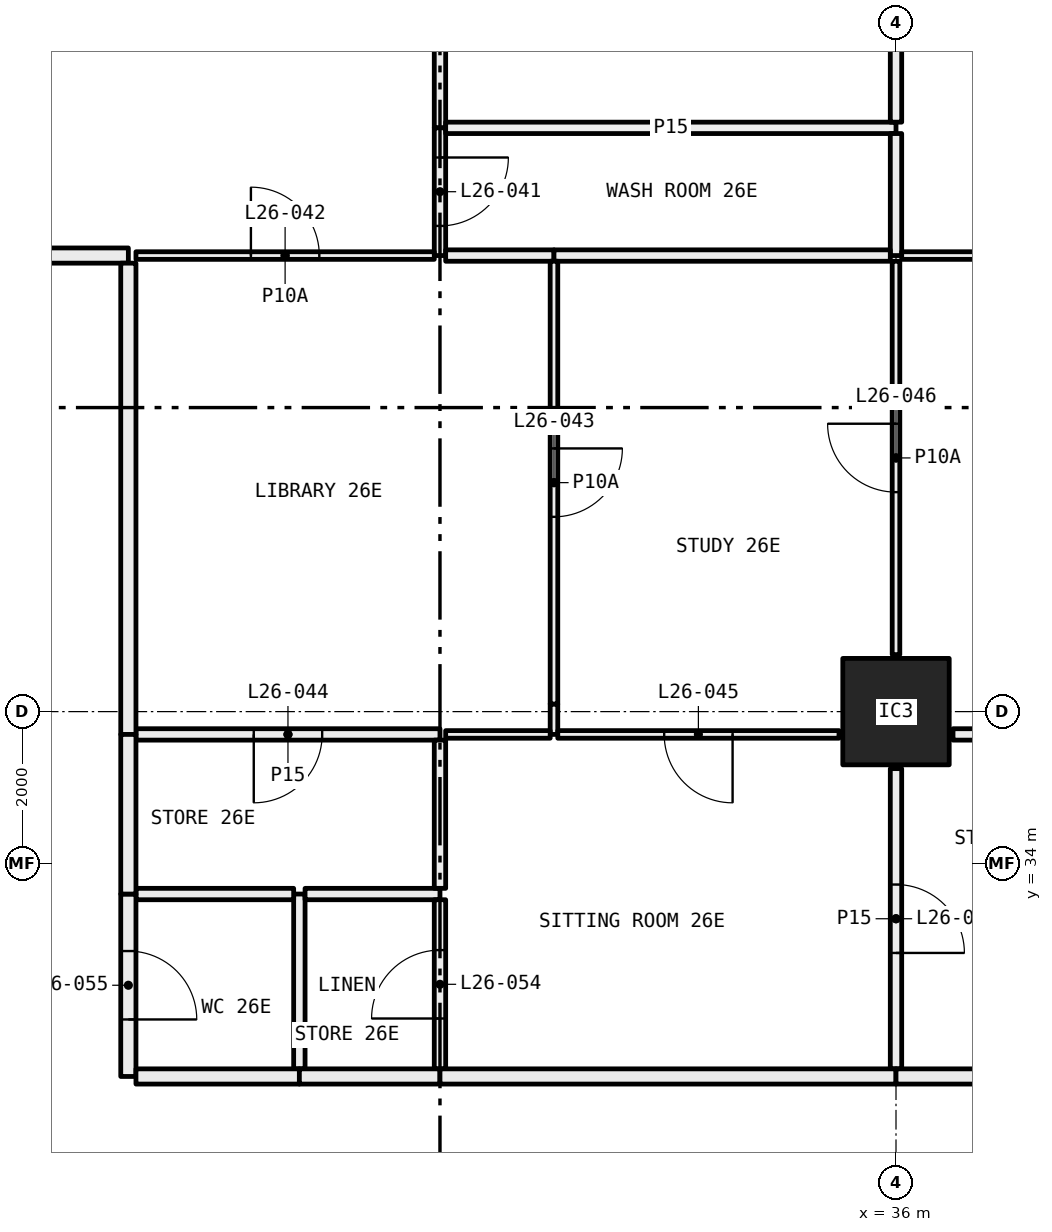
"""IFC4 building model, lengths in metres.
Left out: names, types, materials, properties, quantities, classifications, styles, units other than length and angle.
Written with IfcOpenShell. Run it as: python <this file> out.ifc"""

import sys

from ifc_helpers import new_model, si_unit, direction, frame, frame_2d, origin, origin_2d, place, context, subcontext, project, spatial, rectangle, hollow_rectangle, extrude, element, fill, save


model = new_model("IFC4")
c1 = context("Model", 3, precision=1e-05, world=origin(), true_north=direction((0.0, 1.0)))
c2 = subcontext(c1, "Body", "Model", "MODEL_VIEW")
j1 = project(units=[si_unit("LENGTHUNIT", "METRE"), si_unit("PLANEANGLEUNIT", "RADIAN")], contexts=[c1])
p1 = place(None, origin())
s1 = spatial("IfcSite", under=j1, at=p1, CompositionType="ELEMENT")
p2 = place(p1, origin())
s2 = spatial("IfcBuilding", under=s1, at=p2, CompositionType="ELEMENT")
p3 = place(p2, frame((0.0, 0.0, 103.5)))
s3 = spatial("IfcBuildingStorey", under=s2, at=p3, CompositionType="ELEMENT", Elevation=103.5)
p4 = place(p3, frame((36.0, 36.0, 0.0), z_axis=(0.0, 0.0, 1.0), x_axis=(1.0, 0.0, 0.0)))
e1 = element("IfcColumn", 1, at=p4, inside=s3, PredefinedType="COLUMN", context=c2, shape_type="SweptSolid", body=[
    extrude(hollow_rectangle(XDim=1.4, YDim=1.4, WallThickness=0.06, at=origin_2d()), origin(), (0.0, 0.0, 1.0), 3.05),
])
p5 = place(p3, frame((30.0, 43.68, 0.0), z_axis=(0.0, 0.0, 1.0), x_axis=(0.0, 1.0, 0.0)))
e2 = element("IfcWall", 2, at=p5, inside=s3, PredefinedType="PARTITIONING", context=c2, shape_type="SweptSolid", body=[
    extrude(rectangle(XDim=3.6, YDim=0.15, at=frame_2d((1.8, 0.0))), origin(), (0.0, 0.0, 1.0), 3.05),
])
p6 = place(p5, frame((1.35, 0.0, 0.0)))
e3 = element("IfcOpeningElement", 3, at=p6, cuts=e2, PredefinedType="OPENING", context=c2, shape_type="SweptSolid", body=[
    extrude(rectangle(XDim=0.9, YDim=2.1, at=frame_2d((0.45, 1.05))), frame((0.0, 0.085, 0.0), z_axis=(0.0, -1.0, 0.0), x_axis=(1.0, 0.0, 0.0)), (0.0, 0.0, 1.0), 0.17),
])
p7 = place(p3, frame((30.0, 42.0, 0.0), z_axis=(0.0, 0.0, 1.0), x_axis=(0.0, 1.0, 0.0)))
e4 = element("IfcWall", 4, at=p7, inside=s3, PredefinedType="PARTITIONING", context=c2, shape_type="SweptSolid", body=[
    extrude(rectangle(XDim=1.68, YDim=0.15, at=frame_2d((0.84, 0.0))), origin(), (0.0, 0.0, 1.0), 3.05),
])
p8 = place(p7, frame((0.39, 0.0, 0.0)))
e5 = element("IfcOpeningElement", 5, at=p8, cuts=e4, PredefinedType="OPENING", context=c2, shape_type="SweptSolid", body=[
    extrude(rectangle(XDim=0.9, YDim=2.1, at=frame_2d((0.45, 1.05))), frame((0.0, 0.085, 0.0), z_axis=(0.0, -1.0, 0.0), x_axis=(1.0, 0.0, 0.0)), (0.0, 0.0, 1.0), 0.17),
])
p9 = place(p3, frame((26.0, 42.0, 0.0), z_axis=(0.0, 0.0, 1.0), x_axis=(1.0, 0.0, 0.0)))
e6 = element("IfcWall", 6, at=p9, inside=s3, PredefinedType="PARTITIONING", context=c2, shape_type="SweptSolid", body=[
    extrude(rectangle(XDim=3.925, YDim=0.1, at=frame_2d((1.962, 0.0))), origin(), (0.0, 0.0, 1.0), 3.05),
])
p10 = place(p9, frame((1.512, 0.0, 0.0)))
e7 = element("IfcOpeningElement", 7, at=p10, cuts=e6, PredefinedType="OPENING", context=c2, shape_type="SweptSolid", body=[
    extrude(rectangle(XDim=0.9, YDim=2.1, at=frame_2d((0.45, 1.05))), frame((0.0, 0.06, 0.0), z_axis=(0.0, -1.0, 0.0), x_axis=(1.0, 0.0, 0.0)), (0.0, 0.0, 1.0), 0.12),
])
p11 = place(p3, frame((24.0, 42.0, 0.0), z_axis=(0.0, 0.0, 1.0), x_axis=(1.0, 0.0, 0.0)))
e8 = element("IfcWall", 8, at=p11, inside=s3, PredefinedType="PARTITIONING", context=c2, shape_type="SweptSolid", body=[
    extrude(rectangle(XDim=1.9, YDim=0.2, at=frame_2d((0.95, 0.0))), origin(), (0.0, 0.0, 1.0), 3.05),
])
p12 = place(p3, frame((30.075, 43.68, 0.0), z_axis=(0.0, 0.0, 1.0), x_axis=(1.0, 0.0, 0.0)))
e9 = element("IfcWall", 9, at=p12, inside=s3, PredefinedType="PARTITIONING", context=c2, shape_type="SweptSolid", body=[
    extrude(rectangle(XDim=5.925, YDim=0.15, at=frame_2d((2.962, 0.0))), origin(), (0.0, 0.0, 1.0), 2.45),
])
p13 = place(p3, frame((36.0, 43.755, 0.0), z_axis=(0.0, 0.0, 1.0), x_axis=(0.0, 1.0, 0.0)))
e10 = element("IfcWall", 10, at=p13, inside=s3, PredefinedType="PARTITIONING", context=c2, shape_type="SweptSolid", body=[
    extrude(rectangle(XDim=1.245, YDim=0.15, at=frame_2d((0.623, 0.0))), origin(), (0.0, 0.0, 1.0), 2.45),
])
p14 = place(p3, frame((36.0, 42.0, 0.0), z_axis=(0.0, 0.0, 1.0), x_axis=(0.0, 1.0, 0.0)))
e11 = element("IfcWall", 11, at=p14, inside=s3, PredefinedType="PARTITIONING", context=c2, shape_type="SweptSolid", body=[
    extrude(rectangle(XDim=1.605, YDim=0.15, at=frame_2d((0.802, 0.0))), origin(), (0.0, 0.0, 1.0), 2.45),
])
p15 = place(p3, frame((30.075, 42.0, 0.0), z_axis=(0.0, 0.0, 1.0), x_axis=(1.0, 0.0, 0.0)))
e12 = element("IfcWall", 12, at=p15, inside=s3, PredefinedType="PARTITIONING", context=c2, shape_type="SweptSolid", body=[
    extrude(rectangle(XDim=1.425, YDim=0.15, at=frame_2d((0.712, 0.0))), origin(), (0.0, 0.0, 1.0), 3.05),
])
p16 = place(p3, frame((31.5, 42.0, 0.0), z_axis=(0.0, 0.0, 1.0), x_axis=(1.0, 0.0, 0.0)))
e13 = element("IfcWall", 13, at=p16, inside=s3, PredefinedType="PARTITIONING", context=c2, shape_type="SweptSolid", body=[
    extrude(rectangle(XDim=4.425, YDim=0.15, at=frame_2d((2.212, 0.0))), origin(), (0.0, 0.0, 1.0), 2.45),
])
p17 = place(p3, frame((36.075, 42.0, 0.0), z_axis=(0.0, 0.0, 1.0), x_axis=(1.0, 0.0, 0.0)))
e14 = element("IfcWall", 14, at=p17, inside=s3, PredefinedType="PARTITIONING", context=c2, shape_type="SweptSolid", body=[
    extrude(rectangle(XDim=9.925, YDim=0.1, at=frame_2d((4.962, 0.0))), origin(), (0.0, 0.0, 1.0), 2.45),
])
p18 = place(p17, frame((4.512, 0.0, 0.0)))
e15 = element("IfcOpeningElement", 15, at=p18, cuts=e14, PredefinedType="OPENING", context=c2, shape_type="SweptSolid", body=[
    extrude(rectangle(XDim=0.9, YDim=2.1, at=frame_2d((0.45, 1.05))), frame((0.0, 0.06, 0.0), z_axis=(0.0, -1.0, 0.0), x_axis=(1.0, 0.0, 0.0)), (0.0, 0.0, 1.0), 0.12),
])
p19 = place(p3, frame((31.5, 35.7, 0.0), z_axis=(0.0, 0.0, 1.0), x_axis=(0.0, 1.0, 0.0)))
e16 = element("IfcWall", 16, at=p19, inside=s3, PredefinedType="PARTITIONING", context=c2, shape_type="SweptSolid", body=[
    extrude(rectangle(XDim=0.4, YDim=0.1, at=frame_2d((0.2, 0.0))), origin(), (0.0, 0.0, 1.0), 2.45),
])
p20 = place(p3, frame((31.5, 36.1, 0.0), z_axis=(0.0, 0.0, 1.0), x_axis=(0.0, 1.0, 0.0)))
e17 = element("IfcWall", 17, at=p20, inside=s3, PredefinedType="PARTITIONING", context=c2, shape_type="SweptSolid", body=[
    extrude(rectangle(XDim=5.825, YDim=0.1, at=frame_2d((2.913, 0.0))), origin(), (0.0, 0.0, 1.0), 3.05),
])
p21 = place(p20, frame((2.462, 0.0, 0.0)))
e18 = element("IfcOpeningElement", 18, at=p21, cuts=e17, PredefinedType="OPENING", context=c2, shape_type="SweptSolid", body=[
    extrude(rectangle(XDim=0.9, YDim=2.1, at=frame_2d((0.45, 1.05))), frame((0.0, 0.06, 0.0), z_axis=(0.0, -1.0, 0.0), x_axis=(1.0, 0.0, 0.0)), (0.0, 0.0, 1.0), 0.12),
])
p22 = place(p3, frame((26.0, 35.7, 0.0), z_axis=(0.0, 0.0, 1.0), x_axis=(1.0, 0.0, 0.0)))
e19 = element("IfcWall", 19, at=p22, inside=s3, PredefinedType="PARTITIONING", context=c2, shape_type="SweptSolid", body=[
    extrude(rectangle(XDim=4.0, YDim=0.15, at=frame_2d((2.0, 0.0))), origin(), (0.0, 0.0, 1.0), 3.05),
])
p23 = place(p22, frame((1.55, 0.0, 0.0)))
e20 = element("IfcOpeningElement", 20, at=p23, cuts=e19, PredefinedType="OPENING", context=c2, shape_type="SweptSolid", body=[
    extrude(rectangle(XDim=0.9, YDim=2.1, at=frame_2d((0.45, 1.05))), frame((0.0, 0.085, 0.0), z_axis=(0.0, -1.0, 0.0), x_axis=(1.0, 0.0, 0.0)), (0.0, 0.0, 1.0), 0.17),
])
p24 = place(p3, frame((30.075, 35.7, 0.0), z_axis=(0.0, 0.0, 1.0), x_axis=(1.0, 0.0, 0.0)))
e21 = element("IfcWall", 21, at=p24, inside=s3, PredefinedType="PARTITIONING", context=c2, shape_type="SweptSolid", body=[
    extrude(rectangle(XDim=1.375, YDim=0.1, at=frame_2d((0.688, 0.0))), origin(), (0.0, 0.0, 1.0), 3.05),
])
p25 = place(p3, frame((25.9, 41.9, 0.0), z_axis=(0.0, 0.0, 1.0), x_axis=(0.0, -1.0, 0.0)))
e22 = element("IfcWall", 22, at=p25, inside=s3, PredefinedType="PARTITIONING", context=c2, shape_type="SweptSolid", body=[
    extrude(rectangle(XDim=6.2, YDim=0.2, at=frame_2d((3.1, 0.0))), origin(), (0.0, 0.0, 1.0), 2.45),
])
p26 = place(p3, frame((31.55, 35.7, 0.0), z_axis=(0.0, 0.0, 1.0), x_axis=(1.0, 0.0, 0.0)))
e23 = element("IfcWall", 23, at=p26, inside=s3, PredefinedType="PARTITIONING", context=c2, shape_type="SweptSolid", body=[
    extrude(rectangle(XDim=3.7, YDim=0.1, at=frame_2d((1.85, 0.0))), origin(), (0.0, 0.0, 1.0), 3.05),
])
p27 = place(p26, frame((1.4, 0.0, 0.0)))
e24 = element("IfcOpeningElement", 24, at=p27, cuts=e23, PredefinedType="OPENING", context=c2, shape_type="SweptSolid", body=[
    extrude(rectangle(XDim=0.9, YDim=2.1, at=frame_2d((0.45, 1.05))), frame((0.0, 0.06, 0.0), z_axis=(0.0, -1.0, 0.0), x_axis=(1.0, 0.0, 0.0)), (0.0, 0.0, 1.0), 0.12),
])
p28 = place(p3, frame((36.0, 36.75, 0.0), z_axis=(0.0, 0.0, 1.0), x_axis=(0.0, 1.0, 0.0)))
e25 = element("IfcWall", 25, at=p28, inside=s3, PredefinedType="PARTITIONING", context=c2, shape_type="SweptSolid", body=[
    extrude(rectangle(XDim=5.175, YDim=0.1, at=frame_2d((2.587, 0.0))), origin(), (0.0, 0.0, 1.0), 2.45),
])
p29 = place(p28, frame((2.137, 0.0, 0.0)))
e26 = element("IfcOpeningElement", 26, at=p29, cuts=e25, PredefinedType="OPENING", context=c2, shape_type="SweptSolid", body=[
    extrude(rectangle(XDim=0.9, YDim=2.1, at=frame_2d((0.45, 1.05))), frame((0.0, 0.06, 0.0), z_axis=(0.0, -1.0, 0.0), x_axis=(1.0, 0.0, 0.0)), (0.0, 0.0, 1.0), 0.12),
])
p30 = place(p3, frame((28.15, 31.3, 0.0), z_axis=(0.0, 0.0, 1.0), x_axis=(0.0, 1.0, 0.0)))
e27 = element("IfcWall", 27, at=p30, inside=s3, PredefinedType="PARTITIONING", context=c2, shape_type="SweptSolid", body=[
    extrude(rectangle(XDim=2.3, YDim=0.15, at=frame_2d((1.15, 0.0))), origin(), (0.0, 0.0, 1.0), 3.05),
])
p31 = place(p3, frame((28.075, 33.6, 0.0), z_axis=(0.0, 0.0, 1.0), x_axis=(-1.0, 0.0, 0.0)))
e28 = element("IfcWall", 28, at=p31, inside=s3, PredefinedType="PARTITIONING", context=c2, shape_type="SweptSolid", body=[
    extrude(rectangle(XDim=2.075, YDim=0.15, at=frame_2d((1.038, 0.0))), origin(), (0.0, 0.0, 1.0), 3.05),
])
p32 = place(p3, frame((25.9, 33.6, 0.0), z_axis=(0.0, 0.0, 1.0), x_axis=(0.0, -1.0, 0.0)))
e29 = element("IfcWall", 29, at=p32, inside=s3, PredefinedType="PARTITIONING", context=c2, shape_type="SweptSolid", body=[
    extrude(rectangle(XDim=2.4, YDim=0.2, at=frame_2d((1.2, 0.0))), origin(), (0.0, 0.0, 1.0), 3.05),
])
p33 = place(p32, frame((0.75, 0.0, 0.0)))
e30 = element("IfcOpeningElement", 30, at=p33, cuts=e29, PredefinedType="OPENING", context=c2, shape_type="SweptSolid", body=[
    extrude(rectangle(XDim=0.9, YDim=2.1, at=frame_2d((0.45, 1.05))), frame((0.0, 0.11, 0.0), z_axis=(0.0, -1.0, 0.0), x_axis=(1.0, 0.0, 0.0)), (0.0, 0.0, 1.0), 0.22),
])
p34 = place(p3, frame((26.0, 31.2, 0.0), z_axis=(0.0, 0.0, 1.0), x_axis=(1.0, 0.0, 0.0)))
e31 = element("IfcWall", 31, at=p34, inside=s3, PredefinedType="PARTITIONING", context=c2, shape_type="SweptSolid", body=[
    extrude(rectangle(XDim=2.15, YDim=0.2, at=frame_2d((1.075, 0.0))), origin(), (0.0, 0.0, 1.0), 3.05),
])
p35 = place(p3, frame((30.0, 33.6, 0.0), z_axis=(0.0, 0.0, 1.0), x_axis=(-1.0, 0.0, 0.0)))
e32 = element("IfcWall", 32, at=p35, inside=s3, PredefinedType="PARTITIONING", context=c2, shape_type="SweptSolid", body=[
    extrude(rectangle(XDim=1.775, YDim=0.15, at=frame_2d((0.887, 0.0))), origin(), (0.0, 0.0, 1.0), 3.05),
])
p36 = place(p3, frame((30.0, 31.3, 0.0), z_axis=(0.0, 0.0, 1.0), x_axis=(0.0, 1.0, 0.0)))
e33 = element("IfcWall", 33, at=p36, inside=s3, PredefinedType="PARTITIONING", context=c2, shape_type="SweptSolid", body=[
    extrude(rectangle(XDim=2.225, YDim=0.15, at=frame_2d((1.112, 0.0))), origin(), (0.0, 0.0, 1.0), 3.05),
])
p37 = place(p36, frame((0.663, 0.0, 0.0)))
e34 = element("IfcOpeningElement", 34, at=p37, cuts=e33, PredefinedType="OPENING", context=c2, shape_type="SweptSolid", body=[
    extrude(rectangle(XDim=0.9, YDim=2.1, at=frame_2d((0.45, 1.05))), frame((0.0, 0.085, 0.0), z_axis=(0.0, -1.0, 0.0), x_axis=(1.0, 0.0, 0.0)), (0.0, 0.0, 1.0), 0.17),
])
p38 = place(p3, frame((28.15, 31.2, 0.0), z_axis=(0.0, 0.0, 1.0), x_axis=(1.0, 0.0, 0.0)))
e35 = element("IfcWall", 35, at=p38, inside=s3, PredefinedType="PARTITIONING", context=c2, shape_type="SweptSolid", body=[
    extrude(rectangle(XDim=1.85, YDim=0.2, at=frame_2d((0.925, 0.0))), origin(), (0.0, 0.0, 1.0), 3.05),
])
p39 = place(p3, frame((30.0, 33.675, 0.0), z_axis=(0.0, 0.0, 1.0), x_axis=(0.0, 1.0, 0.0)))
e36 = element("IfcWall", 36, at=p39, inside=s3, PredefinedType="PARTITIONING", context=c2, shape_type="SweptSolid", body=[
    extrude(rectangle(XDim=1.95, YDim=0.15, at=frame_2d((0.975, 0.0))), origin(), (0.0, 0.0, 1.0), 3.05),
])
p40 = place(p3, frame((25.9, 35.7, 0.0), z_axis=(0.0, 0.0, 1.0), x_axis=(0.0, -1.0, 0.0)))
e37 = element("IfcWall", 37, at=p40, inside=s3, PredefinedType="PARTITIONING", context=c2, shape_type="SweptSolid", body=[
    extrude(rectangle(XDim=2.1, YDim=0.2, at=frame_2d((1.05, 0.0))), origin(), (0.0, 0.0, 1.0), 3.05),
])
p41 = place(p3, frame((36.0, 31.3, 0.0), z_axis=(0.0, 0.0, 1.0), x_axis=(0.0, 1.0, 0.0)))
e38 = element("IfcWall", 38, at=p41, inside=s3, PredefinedType="PARTITIONING", context=c2, shape_type="SweptSolid", body=[
    extrude(rectangle(XDim=3.95, YDim=0.15, at=frame_2d((1.975, 0.0))), origin(), (0.0, 0.0, 1.0), 2.45),
])
p42 = place(p41, frame((1.525, 0.0, 0.0)))
e39 = element("IfcOpeningElement", 39, at=p42, cuts=e38, PredefinedType="OPENING", context=c2, shape_type="SweptSolid", body=[
    extrude(rectangle(XDim=0.9, YDim=2.1, at=frame_2d((0.45, 1.05))), frame((0.0, 0.085, 0.0), z_axis=(0.0, -1.0, 0.0), x_axis=(1.0, 0.0, 0.0)), (0.0, 0.0, 1.0), 0.17),
])
p43 = place(p3, frame((30.0, 31.2, 0.0), z_axis=(0.0, 0.0, 1.0), x_axis=(1.0, 0.0, 0.0)))
e40 = element("IfcWall", 40, at=p43, inside=s3, PredefinedType="PARTITIONING", context=c2, shape_type="SweptSolid", body=[
    extrude(rectangle(XDim=6.0, YDim=0.2, at=frame_2d((3.0, 0.0))), origin(), (0.0, 0.0, 1.0), 2.45),
])
p44 = place(p3, frame((36.75, 35.7, 0.0), z_axis=(0.0, 0.0, 1.0), x_axis=(1.0, 0.0, 0.0)))
e41 = element("IfcWall", 41, at=p44, inside=s3, PredefinedType="PARTITIONING", context=c2, shape_type="SweptSolid", body=[
    extrude(rectangle(XDim=1.917, YDim=0.15, at=frame_2d((0.958, 0.0))), origin(), (0.0, 0.0, 1.0), 3.05),
])
p45 = place(p3, frame((36.0, 31.2, 0.0), z_axis=(0.0, 0.0, 1.0), x_axis=(1.0, 0.0, 0.0)))
e42 = element("IfcWall", 42, at=p45, inside=s3, PredefinedType="PARTITIONING", context=c2, shape_type="SweptSolid", body=[
    extrude(rectangle(XDim=2.667, YDim=0.2, at=frame_2d((1.333, 0.0))), origin(), (0.0, 0.0, 1.0), 2.45),
])
p46 = place(p8, frame((0.9, 0.0, 0.0), x_axis=(-1.0, 0.0, 0.0)))
e43 = element("IfcDoor", 43, at=p46, inside=s3, OperationType="SINGLE_SWING_RIGHT", PredefinedType="DOOR", context=c2, shape_type="SweptSolid", body=[
    extrude(rectangle(XDim=0.9, YDim=2.1, at=frame_2d((0.45, 1.05))), frame((0.0, 0.025, 0.0), z_axis=(0.0, -1.0, 0.0), x_axis=(1.0, 0.0, 0.0)), (0.0, 0.0, 1.0), 0.05),
])
fill(e5, e43)
p47 = place(p10, origin())
e44 = element("IfcDoor", 44, at=p47, inside=s3, OperationType="SINGLE_SWING_RIGHT", PredefinedType="DOOR", context=c2, shape_type="SweptSolid", body=[
    extrude(rectangle(XDim=0.9, YDim=2.1, at=frame_2d((0.45, 1.05))), frame((0.0, 0.025, 0.0), z_axis=(0.0, -1.0, 0.0), x_axis=(1.0, 0.0, 0.0)), (0.0, 0.0, 1.0), 0.05),
])
fill(e7, e44)
p48 = place(p21, frame((0.9, 0.0, 0.0), x_axis=(-1.0, 0.0, 0.0)))
e45 = element("IfcDoor", 45, at=p48, inside=s3, OperationType="SINGLE_SWING_RIGHT", PredefinedType="DOOR", context=c2, shape_type="SweptSolid", body=[
    extrude(rectangle(XDim=0.9, YDim=2.1, at=frame_2d((0.45, 1.05))), frame((0.0, 0.025, 0.0), z_axis=(0.0, -1.0, 0.0), x_axis=(1.0, 0.0, 0.0)), (0.0, 0.0, 1.0), 0.05),
])
fill(e18, e45)
p49 = place(p23, frame((0.9, 0.0, 0.0), x_axis=(-1.0, 0.0, 0.0)))
e46 = element("IfcDoor", 46, at=p49, inside=s3, OperationType="SINGLE_SWING_LEFT", PredefinedType="DOOR", context=c2, shape_type="SweptSolid", body=[
    extrude(rectangle(XDim=0.9, YDim=2.1, at=frame_2d((0.45, 1.05))), frame((0.0, 0.025, 0.0), z_axis=(0.0, -1.0, 0.0), x_axis=(1.0, 0.0, 0.0)), (0.0, 0.0, 1.0), 0.05),
])
fill(e20, e46)
p50 = place(p27, frame((0.9, 0.0, 0.0), x_axis=(-1.0, 0.0, 0.0)))
e47 = element("IfcDoor", 47, at=p50, inside=s3, OperationType="SINGLE_SWING_RIGHT", PredefinedType="DOOR", context=c2, shape_type="SweptSolid", body=[
    extrude(rectangle(XDim=0.9, YDim=2.1, at=frame_2d((0.45, 1.05))), frame((0.0, 0.025, 0.0), z_axis=(0.0, -1.0, 0.0), x_axis=(1.0, 0.0, 0.0)), (0.0, 0.0, 1.0), 0.05),
])
fill(e24, e47)
p51 = place(p29, origin())
e48 = element("IfcDoor", 48, at=p51, inside=s3, OperationType="SINGLE_SWING_LEFT", PredefinedType="DOOR", context=c2, shape_type="SweptSolid", body=[
    extrude(rectangle(XDim=0.9, YDim=2.1, at=frame_2d((0.45, 1.05))), frame((0.0, 0.025, 0.0), z_axis=(0.0, -1.0, 0.0), x_axis=(1.0, 0.0, 0.0)), (0.0, 0.0, 1.0), 0.05),
])
fill(e26, e48)
p52 = place(p42, frame((0.9, 0.0, 0.0), x_axis=(-1.0, 0.0, 0.0)))
e49 = element("IfcDoor", 49, at=p52, inside=s3, OperationType="SINGLE_SWING_LEFT", PredefinedType="DOOR", context=c2, shape_type="SweptSolid", body=[
    extrude(rectangle(XDim=0.9, YDim=2.1, at=frame_2d((0.45, 1.05))), frame((0.0, 0.025, 0.0), z_axis=(0.0, -1.0, 0.0), x_axis=(1.0, 0.0, 0.0)), (0.0, 0.0, 1.0), 0.05),
])
fill(e39, e49)
p53 = place(p37, origin())
e50 = element("IfcDoor", 50, at=p53, inside=s3, OperationType="SINGLE_SWING_RIGHT", PredefinedType="DOOR", context=c2, shape_type="SweptSolid", body=[
    extrude(rectangle(XDim=0.9, YDim=2.1, at=frame_2d((0.45, 1.05))), frame((0.0, 0.025, 0.0), z_axis=(0.0, -1.0, 0.0), x_axis=(1.0, 0.0, 0.0)), (0.0, 0.0, 1.0), 0.05),
])
fill(e34, e50)
p54 = place(p33, origin())
e51 = element("IfcDoor", 51, at=p54, inside=s3, OperationType="SINGLE_SWING_LEFT", PredefinedType="DOOR", context=c2, shape_type="SweptSolid", body=[
    extrude(rectangle(XDim=0.9, YDim=2.1, at=frame_2d((0.45, 1.05))), frame((0.0, 0.025, 0.0), z_axis=(0.0, -1.0, 0.0), x_axis=(1.0, 0.0, 0.0)), (0.0, 0.0, 1.0), 0.05),
])
fill(e30, e51)
save(model, sys.argv[1])
